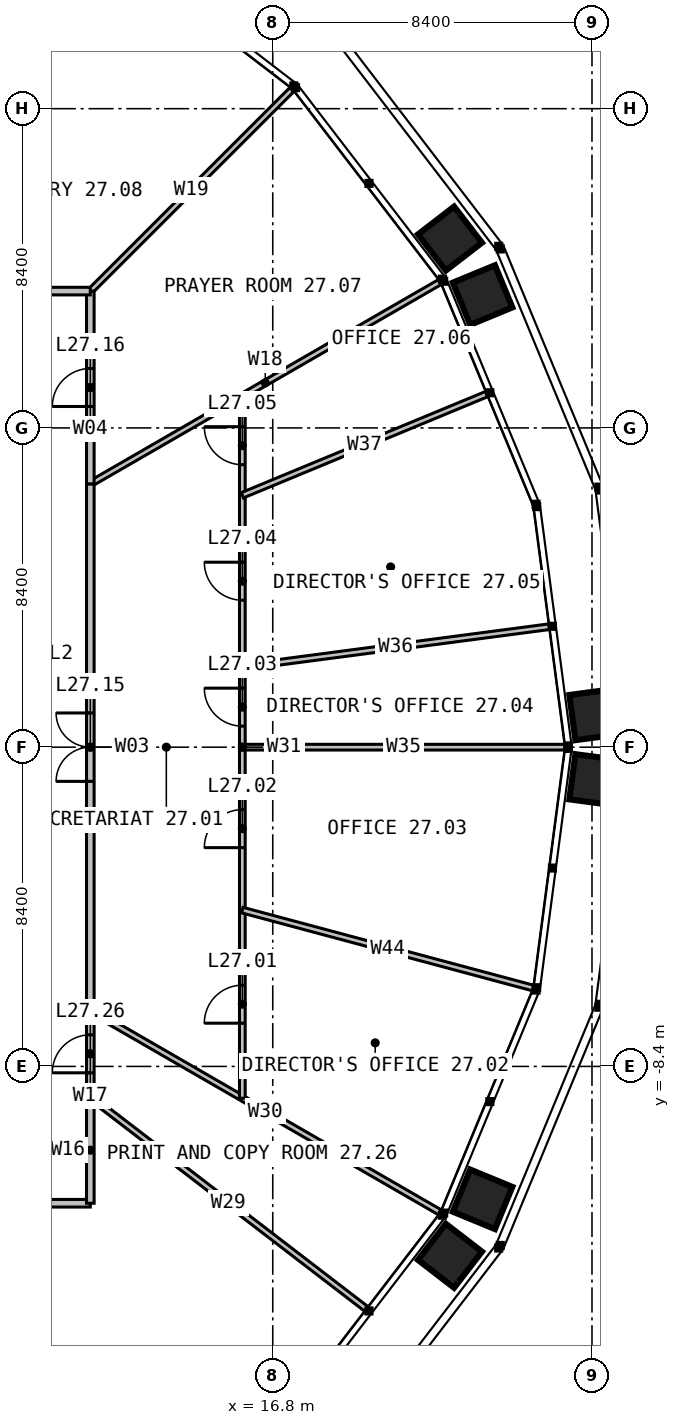
"""IFC4 building model, lengths in metres.
Left out: names, types, materials, properties, quantities, classifications, styles, units other than length and angle.
Written with IfcOpenShell. Run it as: python <this file> out.ifc"""

import sys

from ifc_helpers import new_model, si_unit, direction, frame, frame_2d, origin, place, context, subcontext, project, spatial, rectangle, extrude, element, fill, save


model = new_model("IFC4")
c1 = context("Model", 3, precision=1e-05, world=origin(), true_north=direction((0.0, 1.0)))
c2 = subcontext(c1, "Body", "Model", "MODEL_VIEW")
j1 = project(units=[si_unit("LENGTHUNIT", "METRE"), si_unit("PLANEANGLEUNIT", "RADIAN")], contexts=[c1])
p1 = place(None, origin())
s1 = spatial("IfcSite", under=j1, at=p1, CompositionType="ELEMENT")
p2 = place(p1, origin())
s2 = spatial("IfcBuilding", under=s1, at=p2, CompositionType="ELEMENT")
p3 = place(p2, frame((0.0, 0.0, 114.0)))
s3 = spatial("IfcBuildingStorey", under=s2, at=p3, CompositionType="ELEMENT", Elevation=114.0)
for number, where, z_axis, x_axis in (
    (1, (12.0, -6.928, 0.0), (0.0, 0.0, 1.0), (0.866, -0.5, 0.0)),
    (2, (12.0, 6.928, 0.0), (0.0, 0.0, 1.0), (0.866, 0.5, 0.0)),
):
    element("IfcWall", number, at=place(p3, frame(where, z_axis=z_axis, x_axis=x_axis)), inside=s3, PredefinedType="PARTITIONING", context=c2, shape_type="SweptSolid", body=[
        extrude(rectangle(XDim=10.631, YDim=0.15, at=frame_2d((5.315, 0.0))), origin(), (0.0, 0.0, 1.0), 2.79),
    ])
p4 = place(p3, frame((12.0, 12.0, 0.0), z_axis=(0.0, 0.0, 1.0), x_axis=(0.707106781187, 0.707106781187, 0.0)))
e3 = element("IfcWall", 3, at=p4, inside=s3, PredefinedType="PARTITIONING", context=c2, shape_type="SweptSolid", body=[
    extrude(rectangle(XDim=7.517, YDim=0.15, at=frame_2d((3.758, 0.0))), origin(), (0.0, 0.0, 1.0), 2.79),
])
for number, where, z_axis, x_axis in (
    (4, (6.928, 12.0, 0.0), (0.0, 0.0, 1.0), (0.5, 0.866, 0.0)),
    (5, (6.928, -12.0, 0.0), (0.0, 0.0, 1.0), (0.5, -0.866, 0.0)),
):
    element("IfcWall", number, at=place(p3, frame(where, z_axis=z_axis, x_axis=x_axis)), inside=s3, PredefinedType="PARTITIONING", context=c2, shape_type="SweptSolid", body=[
        extrude(rectangle(XDim=10.631, YDim=0.15, at=frame_2d((5.315, 0.0))), origin(), (0.0, 0.0, 1.0), 2.79),
    ])
p5 = place(p3, frame((12.0, -9.208, 0.0), z_axis=(0.0, 0.0, 1.0), x_axis=(0.793357264949, -0.608756314261, 0.0)))
e6 = element("IfcWall", 6, at=p5, inside=s3, PredefinedType="PARTITIONING", context=c2, shape_type="SweptSolid", body=[
    extrude(rectangle(XDim=9.152, YDim=0.15, at=frame_2d((4.576, 0.0))), origin(), (0.0, 0.0, 1.0), 2.79),
])
p6 = place(p3, frame((16.0, -9.238, 0.0), z_axis=(0.0, 0.0, 1.0), x_axis=(0.0, 1.0, 0.0)))
e7 = element("IfcWall", 7, at=p6, inside=s3, PredefinedType="PARTITIONING", context=c2, shape_type="SweptSolid", body=[
    extrude(rectangle(XDim=18.475, YDim=0.15, at=frame_2d((9.238, 0.0))), origin(), (0.0, 0.0, 1.0), 2.79),
])
p7 = place(p6, frame((1.975, 0.0, 0.0)))
e8 = element("IfcOpeningElement", 8, at=p7, cuts=e7, PredefinedType="OPENING", context=c2, shape_type="SweptSolid", body=[
    extrude(rectangle(XDim=1.0, YDim=2.2, at=frame_2d((0.5, 1.1))), frame((0.0, 0.085, 0.0), z_axis=(0.0, -1.0, 0.0), x_axis=(1.0, 0.0, 0.0)), (0.0, 0.0, 1.0), 0.17),
])
p8 = place(p6, frame((6.594, 0.0, 0.0)))
e9 = element("IfcOpeningElement", 9, at=p8, cuts=e7, PredefinedType="OPENING", context=c2, shape_type="SweptSolid", body=[
    extrude(rectangle(XDim=1.0, YDim=2.2, at=frame_2d((0.5, 1.1))), frame((0.0, 0.085, 0.0), z_axis=(0.0, -1.0, 0.0), x_axis=(1.0, 0.0, 0.0)), (0.0, 0.0, 1.0), 0.17),
])
p9 = place(p6, frame((9.791, 0.0, 0.0)))
e10 = element("IfcOpeningElement", 10, at=p9, cuts=e7, PredefinedType="OPENING", context=c2, shape_type="SweptSolid", body=[
    extrude(rectangle(XDim=1.0, YDim=2.2, at=frame_2d((0.5, 1.1))), frame((0.0, 0.085, 0.0), z_axis=(0.0, -1.0, 0.0), x_axis=(1.0, 0.0, 0.0)), (0.0, 0.0, 1.0), 0.17),
])
p10 = place(p6, frame((13.104, 0.0, 0.0)))
e11 = element("IfcOpeningElement", 11, at=p10, cuts=e7, PredefinedType="OPENING", context=c2, shape_type="SweptSolid", body=[
    extrude(rectangle(XDim=1.0, YDim=2.2, at=frame_2d((0.5, 1.1))), frame((0.0, 0.085, 0.0), z_axis=(0.0, -1.0, 0.0), x_axis=(1.0, 0.0, 0.0)), (0.0, 0.0, 1.0), 0.17),
])
p11 = place(p6, frame((16.67, 0.0, 0.0)))
e12 = element("IfcOpeningElement", 12, at=p11, cuts=e7, PredefinedType="OPENING", context=c2, shape_type="SweptSolid", body=[
    extrude(rectangle(XDim=1.0, YDim=2.2, at=frame_2d((0.5, 1.1))), frame((0.0, 0.085, 0.0), z_axis=(0.0, -1.0, 0.0), x_axis=(1.0, 0.0, 0.0)), (0.0, 0.0, 1.0), 0.17),
])
p12 = place(p3, frame((16.0, -4.287, 0.0), z_axis=(0.0, 0.0, 1.0), x_axis=(0.965926869261, -0.258815152648, 0.0)))
e13 = element("IfcWall", 13, at=p12, inside=s3, PredefinedType="PARTITIONING", context=c2, shape_type="SweptSolid", body=[
    extrude(rectangle(XDim=7.923, YDim=0.15, at=frame_2d((3.961, 0.0))), origin(), (0.0, 0.0, 1.0), 2.79),
])
p13 = place(p3, frame((16.0, 0.0, 0.0), z_axis=(0.0, 0.0, 1.0), x_axis=(1.0, 0.0, 0.0)))
e14 = element("IfcWall", 14, at=p13, inside=s3, PredefinedType="PARTITIONING", context=c2, shape_type="SweptSolid", body=[
    extrude(rectangle(XDim=8.487, YDim=0.15, at=frame_2d((4.244, 0.0))), origin(), (0.0, 0.0, 1.0), 2.79),
])
p14 = place(p3, frame((16.0, 2.106, 0.0), z_axis=(0.0, 0.0, 1.0), x_axis=(0.99144398145, 0.13053287573, 0.0)))
e15 = element("IfcWall", 15, at=p14, inside=s3, PredefinedType="PARTITIONING", context=c2, shape_type="SweptSolid", body=[
    extrude(rectangle(XDim=8.14, YDim=0.15, at=frame_2d((4.07, 0.0))), origin(), (0.0, 0.0, 1.0), 2.79),
])
p15 = place(p3, frame((16.0, 6.627, 0.0), z_axis=(0.0, 0.0, 1.0), x_axis=(0.923876163616, 0.382691565496, 0.0)))
e16 = element("IfcWall", 16, at=p15, inside=s3, PredefinedType="PARTITIONING", context=c2, shape_type="SweptSolid", body=[
    extrude(rectangle(XDim=6.959, YDim=0.15, at=frame_2d((3.48, 0.0))), origin(), (0.0, 0.0, 1.0), 2.79),
])
p16 = place(p3, frame((12.0, -6.928, 0.0), z_axis=(0.0, 0.0, 1.0), x_axis=(0.0, 1.0, 0.0)))
e17 = element("IfcWall", 17, at=p16, inside=s3, PredefinedType="PARTITIONING", context=c2, shape_type="SweptSolid", body=[
    extrude(rectangle(XDim=13.856, YDim=0.2, at=frame_2d((6.928, 0.0))), origin(), (0.0, 0.0, 1.0), 3.8),
])
p17 = place(p16, frame((6.028, 0.0, 0.0)))
e18 = element("IfcOpeningElement", 18, at=p17, cuts=e17, PredefinedType="OPENING", context=c2, shape_type="SweptSolid", body=[
    extrude(rectangle(XDim=1.8, YDim=2.2, at=frame_2d((0.9, 1.1))), frame((0.0, 0.11, 0.0), z_axis=(0.0, -1.0, 0.0), x_axis=(1.0, 0.0, 0.0)), (0.0, 0.0, 1.0), 0.22),
])
p18 = place(p3, frame((12.0, 6.928, 0.0), z_axis=(0.0, 0.0, 1.0), x_axis=(0.0, 1.0, 0.0)))
e19 = element("IfcWall", 19, at=p18, inside=s3, PredefinedType="PARTITIONING", context=c2, shape_type="SweptSolid", body=[
    extrude(rectangle(XDim=5.072, YDim=0.2, at=frame_2d((2.536, 0.0))), origin(), (0.0, 0.0, 1.0), 3.8),
])
p19 = place(p18, frame((2.036, 0.0, 0.0)))
e20 = element("IfcOpeningElement", 20, at=p19, cuts=e19, PredefinedType="OPENING", context=c2, shape_type="SweptSolid", body=[
    extrude(rectangle(XDim=1.0, YDim=2.2, at=frame_2d((0.5, 1.1))), frame((0.0, 0.11, 0.0), z_axis=(0.0, -1.0, 0.0), x_axis=(1.0, 0.0, 0.0)), (0.0, 0.0, 1.0), 0.22),
])
p20 = place(p3, frame((12.0, 12.0, 0.0), z_axis=(0.0, 0.0, 1.0), x_axis=(-1.0, 0.0, 0.0)))
e21 = element("IfcWall", 21, at=p20, inside=s3, PredefinedType="PARTITIONING", context=c2, shape_type="SweptSolid", body=[
    extrude(rectangle(XDim=5.072, YDim=0.2, at=frame_2d((2.536, 0.0))), origin(), (0.0, 0.0, 1.0), 3.8),
])
p21 = place(p20, frame((2.036, 0.0, 0.0)))
e22 = element("IfcOpeningElement", 22, at=p21, cuts=e21, PredefinedType="OPENING", context=c2, shape_type="SweptSolid", body=[
    extrude(rectangle(XDim=1.0, YDim=2.2, at=frame_2d((0.5, 1.1))), frame((0.0, 0.11, 0.0), z_axis=(0.0, -1.0, 0.0), x_axis=(1.0, 0.0, 0.0)), (0.0, 0.0, 1.0), 0.22),
])
p22 = place(p3, frame((6.928, -12.0, 0.0), z_axis=(0.0, 0.0, 1.0), x_axis=(1.0, 0.0, 0.0)))
e23 = element("IfcWall", 23, at=p22, inside=s3, PredefinedType="PARTITIONING", context=c2, shape_type="SweptSolid", body=[
    extrude(rectangle(XDim=5.072, YDim=0.2, at=frame_2d((2.536, 0.0))), origin(), (0.0, 0.0, 1.0), 3.8),
])
p23 = place(p22, frame((2.036, 0.0, 0.0)))
e24 = element("IfcOpeningElement", 24, at=p23, cuts=e23, PredefinedType="OPENING", context=c2, shape_type="SweptSolid", body=[
    extrude(rectangle(XDim=1.0, YDim=2.2, at=frame_2d((0.5, 1.1))), frame((0.0, 0.11, 0.0), z_axis=(0.0, -1.0, 0.0), x_axis=(1.0, 0.0, 0.0)), (0.0, 0.0, 1.0), 0.22),
])
p24 = place(p3, frame((12.0, -12.0, 0.0), z_axis=(0.0, 0.0, 1.0), x_axis=(0.0, 1.0, 0.0)))
e25 = element("IfcWall", 25, at=p24, inside=s3, PredefinedType="PARTITIONING", context=c2, shape_type="SweptSolid", body=[
    extrude(rectangle(XDim=2.792, YDim=0.2, at=frame_2d((1.396, 0.0))), origin(), (0.0, 0.0, 1.0), 3.8),
])
p25 = place(p3, frame((12.0, -9.208, 0.0), z_axis=(0.0, 0.0, 1.0), x_axis=(0.0, 1.0, 0.0)))
e26 = element("IfcWall", 26, at=p25, inside=s3, PredefinedType="PARTITIONING", context=c2, shape_type="SweptSolid", body=[
    extrude(rectangle(XDim=2.28, YDim=0.2, at=frame_2d((1.14, 0.0))), origin(), (0.0, 0.0, 1.0), 3.8),
])
p26 = place(p25, frame((0.64, 0.0, 0.0)))
e27 = element("IfcOpeningElement", 27, at=p26, cuts=e26, PredefinedType="OPENING", context=c2, shape_type="SweptSolid", body=[
    extrude(rectangle(XDim=1.0, YDim=2.2, at=frame_2d((0.5, 1.1))), frame((0.0, 0.11, 0.0), z_axis=(0.0, -1.0, 0.0), x_axis=(1.0, 0.0, 0.0)), (0.0, 0.0, 1.0), 0.22),
])
p27 = place(p7, origin())
e28 = element("IfcDoor", 28, at=p27, inside=s3, OperationType="SINGLE_SWING_LEFT", PredefinedType="DOOR", context=c2, shape_type="SweptSolid", body=[
    extrude(rectangle(XDim=1.0, YDim=2.2, at=frame_2d((0.5, 1.1))), frame((0.0, 0.025, 0.0), z_axis=(0.0, -1.0, 0.0), x_axis=(1.0, 0.0, 0.0)), (0.0, 0.0, 1.0), 0.05),
])
fill(e8, e28)
p28 = place(p8, origin())
e29 = element("IfcDoor", 29, at=p28, inside=s3, OperationType="SINGLE_SWING_LEFT", PredefinedType="DOOR", context=c2, shape_type="SweptSolid", body=[
    extrude(rectangle(XDim=1.0, YDim=2.2, at=frame_2d((0.5, 1.1))), frame((0.0, 0.025, 0.0), z_axis=(0.0, -1.0, 0.0), x_axis=(1.0, 0.0, 0.0)), (0.0, 0.0, 1.0), 0.05),
])
fill(e9, e29)
p29 = place(p9, origin())
e30 = element("IfcDoor", 30, at=p29, inside=s3, OperationType="SINGLE_SWING_RIGHT", PredefinedType="DOOR", context=c2, shape_type="SweptSolid", body=[
    extrude(rectangle(XDim=1.0, YDim=2.2, at=frame_2d((0.5, 1.1))), frame((0.0, 0.025, 0.0), z_axis=(0.0, -1.0, 0.0), x_axis=(1.0, 0.0, 0.0)), (0.0, 0.0, 1.0), 0.05),
])
fill(e10, e30)
p30 = place(p10, origin())
e31 = element("IfcDoor", 31, at=p30, inside=s3, OperationType="SINGLE_SWING_RIGHT", PredefinedType="DOOR", context=c2, shape_type="SweptSolid", body=[
    extrude(rectangle(XDim=1.0, YDim=2.2, at=frame_2d((0.5, 1.1))), frame((0.0, 0.025, 0.0), z_axis=(0.0, -1.0, 0.0), x_axis=(1.0, 0.0, 0.0)), (0.0, 0.0, 1.0), 0.05),
])
fill(e11, e31)
p31 = place(p11, origin())
e32 = element("IfcDoor", 32, at=p31, inside=s3, OperationType="SINGLE_SWING_RIGHT", PredefinedType="DOOR", context=c2, shape_type="SweptSolid", body=[
    extrude(rectangle(XDim=1.0, YDim=2.2, at=frame_2d((0.5, 1.1))), frame((0.0, 0.025, 0.0), z_axis=(0.0, -1.0, 0.0), x_axis=(1.0, 0.0, 0.0)), (0.0, 0.0, 1.0), 0.05),
])
fill(e12, e32)
p32 = place(p17, origin())
e33 = element("IfcDoor", 33, at=p32, inside=s3, OperationType="DOUBLE_DOOR_SINGLE_SWING", PredefinedType="DOOR", context=c2, shape_type="SweptSolid", body=[
    extrude(rectangle(XDim=1.8, YDim=2.2, at=frame_2d((0.9, 1.1))), frame((0.0, 0.025, 0.0), z_axis=(0.0, -1.0, 0.0), x_axis=(1.0, 0.0, 0.0)), (0.0, 0.0, 1.0), 0.05),
])
fill(e18, e33)
p33 = place(p19, origin())
e34 = element("IfcDoor", 34, at=p33, inside=s3, OperationType="SINGLE_SWING_LEFT", PredefinedType="DOOR", context=c2, shape_type="SweptSolid", body=[
    extrude(rectangle(XDim=1.0, YDim=2.2, at=frame_2d((0.5, 1.1))), frame((0.0, 0.025, 0.0), z_axis=(0.0, -1.0, 0.0), x_axis=(1.0, 0.0, 0.0)), (0.0, 0.0, 1.0), 0.05),
])
fill(e20, e34)
p34 = place(p26, origin())
e35 = element("IfcDoor", 35, at=p34, inside=s3, OperationType="SINGLE_SWING_LEFT", PredefinedType="DOOR", context=c2, shape_type="SweptSolid", body=[
    extrude(rectangle(XDim=1.0, YDim=2.2, at=frame_2d((0.5, 1.1))), frame((0.0, 0.025, 0.0), z_axis=(0.0, -1.0, 0.0), x_axis=(1.0, 0.0, 0.0)), (0.0, 0.0, 1.0), 0.05),
])
fill(e27, e35)
save(model, sys.argv[1])
